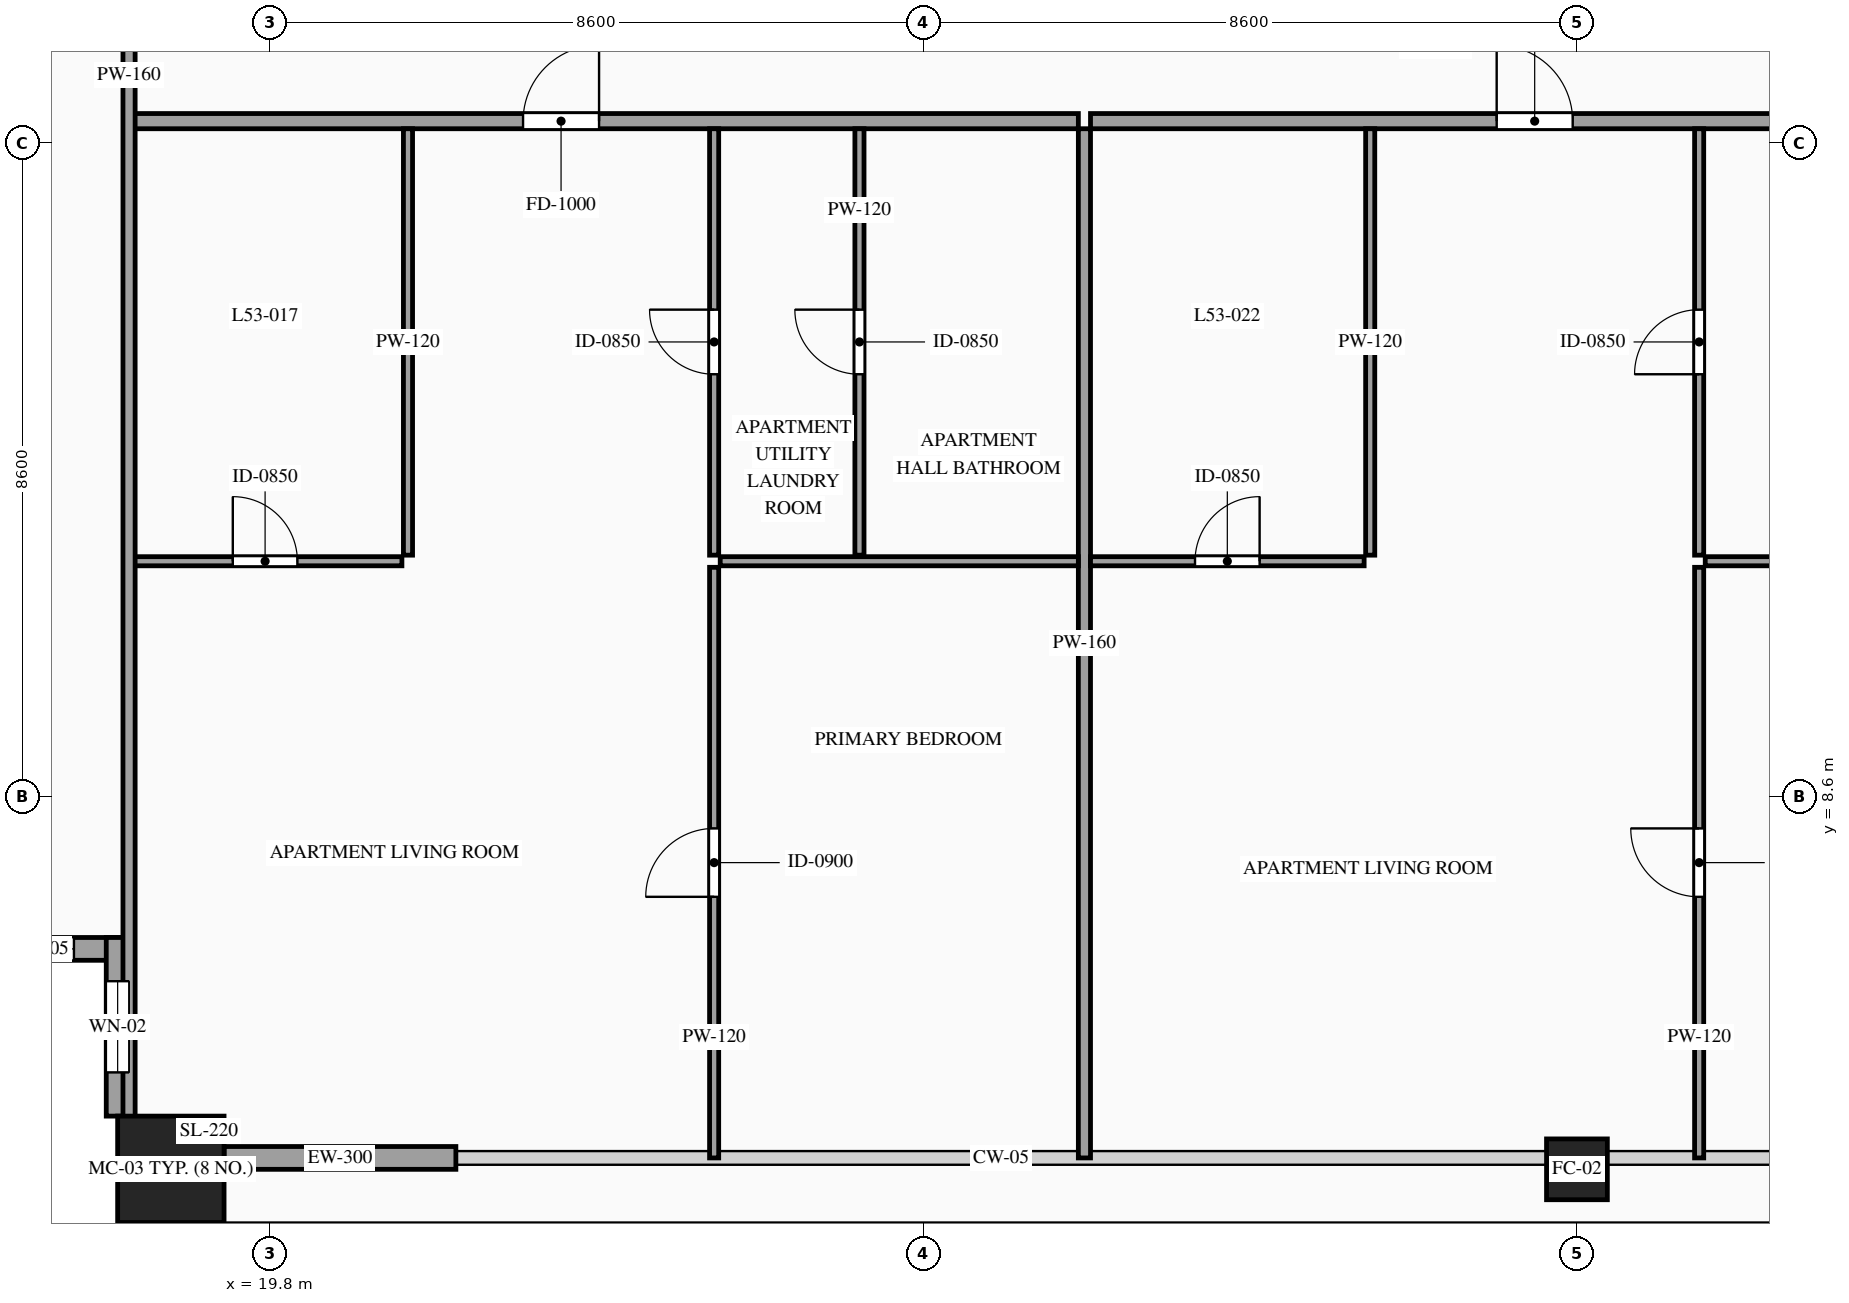
"""IFC4 building model, lengths in metres.
Left out: names, types, materials, properties, quantities, classifications, styles, units other than length and angle.
Written with IfcOpenShell. Run it as: python <this file> out.ifc"""

import sys

from ifc_helpers import new_model, si_unit, direction, frame, frame_2d, origin, origin_2d, place, context, subcontext, project, spatial, rectangle, hollow_rectangle, extrude, source, transform, mapped, element, fill, save


model = new_model("IFC4")
c1 = context("Model", 3, precision=1e-05, world=origin(), true_north=direction((0.0, 1.0)))
c2 = subcontext(c1, "Body", "Model", "MODEL_VIEW")
j1 = project(units=[si_unit("LENGTHUNIT", "METRE"), si_unit("PLANEANGLEUNIT", "RADIAN")], contexts=[c1])
p1 = place(None, origin())
s1 = spatial("IfcSite", under=j1, at=p1, CompositionType="ELEMENT")
p2 = place(p1, origin())
s2 = spatial("IfcBuilding", under=s1, at=p2, CompositionType="ELEMENT")
p3 = place(p2, frame((0.0, 0.0, 202.0)))
s3 = spatial("IfcBuildingStorey", under=s2, at=p3, CompositionType="ELEMENT", Elevation=202.0)
m1 = source(origin(), c2, "Body", "SweptSolid", [
    extrude(hollow_rectangle(XDim=1.4, YDim=1.4, WallThickness=0.06, at=origin_2d()), origin(), (0.0, 0.0, 1.0), 3.5),
])
p4 = place(p3, frame((18.5, 3.7, 0.0), z_axis=(0.0, 0.0, 1.0), x_axis=(1.0, 0.0, 0.0)))
e1 = element("IfcColumn", 1, at=p4, inside=s3, PredefinedType="COLUMN", context=c2, shape_type="MappedRepresentation", body=[
    mapped(m1, transform((0.0, 0.0, 0.0), scale=1.0)),
])
m2 = source(origin(), c2, "Body", "SweptSolid", [
    extrude(hollow_rectangle(XDim=0.8, YDim=0.8, WallThickness=0.036, at=origin_2d()), origin(), (0.0, 0.0, 1.0), 3.5),
])
p5 = place(p3, frame((37.0, 3.7, 0.0), z_axis=(0.0, 0.0, 1.0), x_axis=(1.0, 0.0, 0.0)))
e2 = element("IfcColumn", 2, at=p5, inside=s3, PredefinedType="COLUMN", context=c2, shape_type="MappedRepresentation", body=[
    mapped(m2, transform((0.0, 0.0, 0.0), scale=1.0)),
])
p6 = place(p3, frame((15.6, 6.6, 0.0), z_axis=(0.0, 0.0, 1.0), x_axis=(1.0, 0.0, 0.0)))
e3 = element("IfcWall", 3, at=p6, inside=s3, PredefinedType="SOLIDWALL", context=c2, shape_type="SweptSolid", body=[
    extrude(rectangle(XDim=2.35, YDim=0.3, at=frame_2d((1.175, 0.0))), origin(), (0.0, 0.0, 1.0), 3.28),
])
p7 = place(p6, frame((0.725, 0.0, 0.85)))
e4 = element("IfcOpeningElement", 4, at=p7, cuts=e3, PredefinedType="OPENING", context=c2, shape_type="SweptSolid", body=[
    extrude(rectangle(XDim=0.9, YDim=1.5, at=frame_2d((0.45, 0.75))), frame((0.0, 0.165, 0.0), z_axis=(0.0, -1.0, 0.0), x_axis=(1.0, 0.0, 0.0)), (0.0, 0.0, 1.0), 0.33),
])
p8 = place(p3, frame((17.8, 6.75, 0.0), z_axis=(0.0, 0.0, 1.0), x_axis=(0.0, -1.0, 0.0)))
e5 = element("IfcWall", 5, at=p8, inside=s3, PredefinedType="SOLIDWALL", context=c2, shape_type="SweptSolid", body=[
    extrude(rectangle(XDim=2.35, YDim=0.3, at=frame_2d((1.175, 0.0))), origin(), (0.0, 0.0, 1.0), 3.28),
])
p9 = place(p8, frame((0.575, 0.0, 0.85)))
e6 = element("IfcOpeningElement", 6, at=p9, cuts=e5, PredefinedType="OPENING", context=c2, shape_type="SweptSolid", body=[
    extrude(rectangle(XDim=1.2, YDim=2.1, at=frame_2d((0.6, 1.05))), frame((0.0, 0.165, 0.0), z_axis=(0.0, -1.0, 0.0), x_axis=(1.0, 0.0, 0.0)), (0.0, 0.0, 1.0), 0.33),
])
m3 = source(origin(), c2, "Body", "SweptSolid", [
    extrude(rectangle(XDim=3.05, YDim=0.3, at=frame_2d((1.525, 0.0))), origin(), (0.0, 0.0, 1.0), 2.835),
])
p10 = place(p3, frame((19.2, 3.85, 0.0), z_axis=(0.0, 0.0, 1.0), x_axis=(1.0, 0.0, 0.0)))
e7 = element("IfcWall", 7, at=p10, inside=s3, PredefinedType="SOLIDWALL", context=c2, shape_type="MappedRepresentation", body=[
    mapped(m3, transform((0.0, 0.0, 0.0), scale=1.0)),
])
p11 = place(p3, frame((17.94, 17.49, 0.0), z_axis=(0.0, 0.0, 1.0), x_axis=(1.0, 0.0, 0.0)))
e8 = element("IfcWall", 8, at=p11, inside=s3, PredefinedType="PARTITIONING", context=c2, shape_type="SweptSolid", body=[
    extrude(rectangle(XDim=12.5, YDim=0.2, at=frame_2d((6.25, 0.0))), origin(), (0.0, 0.0, 1.0), 3.28),
])
p12 = place(p11, frame((5.194, 0.0, 0.0)))
e9 = element("IfcOpeningElement", 9, at=p12, cuts=e8, PredefinedType="OPENING", context=c2, shape_type="SweptSolid", body=[
    extrude(rectangle(XDim=1.0, YDim=2.2, at=frame_2d((0.5, 1.1))), frame((0.0, 0.115, 0.0), z_axis=(0.0, -1.0, 0.0), x_axis=(1.0, 0.0, 0.0)), (0.0, 0.0, 1.0), 0.23),
])
m4 = source(origin(), c2, "Body", "SweptSolid", [
    extrude(rectangle(XDim=13.54, YDim=0.16, at=frame_2d((6.77, 0.0))), origin(), (0.0, 0.0, 1.0), 3.28),
])
p13 = place(p3, frame((30.52, 3.85, 0.0), z_axis=(0.0, 0.0, 1.0), x_axis=(0.0, 1.0, 0.0)))
e10 = element("IfcWall", 10, at=p13, inside=s3, PredefinedType="PARTITIONING", context=c2, shape_type="MappedRepresentation", body=[
    mapped(m4, transform((0.0, 0.0, 0.0), scale=1.0)),
])
p14 = place(p3, frame((17.94, 11.7, 0.0), z_axis=(0.0, 0.0, 1.0), x_axis=(1.0, 0.0, 0.0)))
e11 = element("IfcWall", 11, at=p14, inside=s3, PredefinedType="PARTITIONING", context=c2, shape_type="SweptSolid", body=[
    extrude(rectangle(XDim=3.6, YDim=0.12, at=frame_2d((1.8, 0.0))), origin(), (0.0, 0.0, 1.0), 3.28),
])
p15 = place(p14, frame((1.375, 0.0, 0.0)))
e12 = element("IfcOpeningElement", 12, at=p15, cuts=e11, PredefinedType="OPENING", context=c2, shape_type="SweptSolid", body=[
    extrude(rectangle(XDim=0.85, YDim=2.1, at=frame_2d((0.425, 1.05))), frame((0.0, 0.075, 0.0), z_axis=(0.0, -1.0, 0.0), x_axis=(1.0, 0.0, 0.0)), (0.0, 0.0, 1.0), 0.15),
])
m5 = source(origin(), c2, "Body", "SweptSolid", [
    extrude(rectangle(XDim=5.61, YDim=0.12, at=frame_2d((2.805, 0.0))), origin(), (0.0, 0.0, 1.0), 3.28),
])
p16 = place(p3, frame((21.62, 11.78, 0.0), z_axis=(0.0, 0.0, 1.0), x_axis=(0.0, 1.0, 0.0)))
e13 = element("IfcWall", 13, at=p16, inside=s3, PredefinedType="PARTITIONING", context=c2, shape_type="MappedRepresentation", body=[
    mapped(m5, transform((0.0, 0.0, 0.0), scale=1.0)),
])
p17 = place(p3, frame((27.56, 11.78, 0.0), z_axis=(0.0, 0.0, 1.0), x_axis=(0.0, 1.0, 0.0)))
e14 = element("IfcWall", 14, at=p17, inside=s3, PredefinedType="PARTITIONING", context=c2, shape_type="SweptSolid", body=[
    extrude(rectangle(XDim=5.61, YDim=0.12, at=frame_2d((2.805, 0.0))), origin(), (0.0, 0.0, 1.0), 3.28),
])
p18 = place(p17, frame((2.38, 0.0, 0.0)))
e15 = element("IfcOpeningElement", 15, at=p18, cuts=e14, PredefinedType="OPENING", context=c2, shape_type="SweptSolid", body=[
    extrude(rectangle(XDim=0.85, YDim=2.1, at=frame_2d((0.425, 1.05))), frame((0.0, 0.075, 0.0), z_axis=(0.0, -1.0, 0.0), x_axis=(1.0, 0.0, 0.0)), (0.0, 0.0, 1.0), 0.15),
])
m6 = source(origin(), c2, "Body", "SweptSolid", [
    extrude(rectangle(XDim=4.712, YDim=0.12, at=frame_2d((2.356, 0.0))), origin(), (0.0, 0.0, 1.0), 2.875),
])
p19 = place(p3, frame((25.728, 11.7, 0.0), z_axis=(0.0, 0.0, 1.0), x_axis=(1.0, 0.0, 0.0)))
e16 = element("IfcWall", 16, at=p19, inside=s3, PredefinedType="PARTITIONING", context=c2, shape_type="MappedRepresentation", body=[
    mapped(m6, transform((0.0, 0.0, 0.0), scale=1.0)),
])
p20 = place(p3, frame((25.648, 3.85, 0.0), z_axis=(0.0, 0.0, 1.0), x_axis=(0.0, 1.0, 0.0)))
e17 = element("IfcWall", 17, at=p20, inside=s3, PredefinedType="PARTITIONING", context=c2, shape_type="SweptSolid", body=[
    extrude(rectangle(XDim=7.77, YDim=0.12, at=frame_2d((3.885, 0.0))), origin(), (0.0, 0.0, 1.0), 3.28),
])
p21 = place(p20, frame((3.435, 0.0, 0.0)))
e18 = element("IfcOpeningElement", 18, at=p21, cuts=e17, PredefinedType="OPENING", context=c2, shape_type="SweptSolid", body=[
    extrude(rectangle(XDim=0.9, YDim=2.15, at=frame_2d((0.45, 1.075))), frame((0.0, 0.075, 0.0), z_axis=(0.0, -1.0, 0.0), x_axis=(1.0, 0.0, 0.0)), (0.0, 0.0, 1.0), 0.15),
])
p22 = place(p3, frame((25.648, 11.78, 0.0), z_axis=(0.0, 0.0, 1.0), x_axis=(0.0, 1.0, 0.0)))
e19 = element("IfcWall", 19, at=p22, inside=s3, PredefinedType="PARTITIONING", context=c2, shape_type="SweptSolid", body=[
    extrude(rectangle(XDim=5.61, YDim=0.12, at=frame_2d((2.805, 0.0))), origin(), (0.0, 0.0, 1.0), 3.28),
])
p23 = place(p22, frame((2.38, 0.0, 0.0)))
e20 = element("IfcOpeningElement", 20, at=p23, cuts=e19, PredefinedType="OPENING", context=c2, shape_type="SweptSolid", body=[
    extrude(rectangle(XDim=0.85, YDim=2.1, at=frame_2d((0.425, 1.05))), frame((0.0, 0.075, 0.0), z_axis=(0.0, -1.0, 0.0), x_axis=(1.0, 0.0, 0.0)), (0.0, 0.0, 1.0), 0.15),
])
p24 = place(p3, frame((30.6, 17.49, 0.0), z_axis=(0.0, 0.0, 1.0), x_axis=(1.0, 0.0, 0.0)))
e21 = element("IfcWall", 21, at=p24, inside=s3, PredefinedType="PARTITIONING", context=c2, shape_type="SweptSolid", body=[
    extrude(rectangle(XDim=12.8, YDim=0.2, at=frame_2d((6.4, 0.0))), origin(), (0.0, 0.0, 1.0), 3.28),
])
p25 = place(p24, frame((5.344, 0.0, 0.0)))
e22 = element("IfcOpeningElement", 22, at=p25, cuts=e21, PredefinedType="OPENING", context=c2, shape_type="SweptSolid", body=[
    extrude(rectangle(XDim=1.0, YDim=2.2, at=frame_2d((0.5, 1.1))), frame((0.0, 0.115, 0.0), z_axis=(0.0, -1.0, 0.0), x_axis=(1.0, 0.0, 0.0)), (0.0, 0.0, 1.0), 0.23),
])
p26 = place(p3, frame((30.6, 11.7, 0.0), z_axis=(0.0, 0.0, 1.0), x_axis=(1.0, 0.0, 0.0)))
e23 = element("IfcWall", 23, at=p26, inside=s3, PredefinedType="PARTITIONING", context=c2, shape_type="SweptSolid", body=[
    extrude(rectangle(XDim=3.6, YDim=0.12, at=frame_2d((1.8, 0.0))), origin(), (0.0, 0.0, 1.0), 2.875),
])
p27 = place(p26, frame((1.375, 0.0, 0.0)))
e24 = element("IfcOpeningElement", 24, at=p27, cuts=e23, PredefinedType="OPENING", context=c2, shape_type="SweptSolid", body=[
    extrude(rectangle(XDim=0.85, YDim=2.1, at=frame_2d((0.425, 1.05))), frame((0.0, 0.075, 0.0), z_axis=(0.0, -1.0, 0.0), x_axis=(1.0, 0.0, 0.0)), (0.0, 0.0, 1.0), 0.15),
])
p28 = place(p3, frame((34.28, 11.78, 0.0), z_axis=(0.0, 0.0, 1.0), x_axis=(0.0, 1.0, 0.0)))
e25 = element("IfcWall", 25, at=p28, inside=s3, PredefinedType="PARTITIONING", context=c2, shape_type="MappedRepresentation", body=[
    mapped(m5, transform((0.0, 0.0, 0.0), scale=1.0)),
])
p29 = place(p3, frame((38.688, 11.7, 0.0), z_axis=(0.0, 0.0, 1.0), x_axis=(1.0, 0.0, 0.0)))
e26 = element("IfcWall", 26, at=p29, inside=s3, PredefinedType="PARTITIONING", context=c2, shape_type="MappedRepresentation", body=[
    mapped(m6, transform((0.0, 0.0, 0.0), scale=1.0)),
])
p30 = place(p3, frame((38.608, 3.85, 0.0), z_axis=(0.0, 0.0, 1.0), x_axis=(0.0, 1.0, 0.0)))
e27 = element("IfcWall", 27, at=p30, inside=s3, PredefinedType="PARTITIONING", context=c2, shape_type="SweptSolid", body=[
    extrude(rectangle(XDim=7.77, YDim=0.12, at=frame_2d((3.885, 0.0))), origin(), (0.0, 0.0, 1.0), 3.28),
])
p31 = place(p30, frame((3.435, 0.0, 0.0)))
e28 = element("IfcOpeningElement", 28, at=p31, cuts=e27, PredefinedType="OPENING", context=c2, shape_type="SweptSolid", body=[
    extrude(rectangle(XDim=0.9, YDim=2.15, at=frame_2d((0.45, 1.075))), frame((0.0, 0.075, 0.0), z_axis=(0.0, -1.0, 0.0), x_axis=(1.0, 0.0, 0.0)), (0.0, 0.0, 1.0), 0.15),
])
p32 = place(p3, frame((38.608, 11.78, 0.0), z_axis=(0.0, 0.0, 1.0), x_axis=(0.0, 1.0, 0.0)))
e29 = element("IfcWall", 29, at=p32, inside=s3, PredefinedType="PARTITIONING", context=c2, shape_type="SweptSolid", body=[
    extrude(rectangle(XDim=5.61, YDim=0.12, at=frame_2d((2.805, 0.0))), origin(), (0.0, 0.0, 1.0), 3.28),
])
p33 = place(p32, frame((2.38, 0.0, 0.0)))
e30 = element("IfcOpeningElement", 30, at=p33, cuts=e29, PredefinedType="OPENING", context=c2, shape_type="SweptSolid", body=[
    extrude(rectangle(XDim=0.85, YDim=2.1, at=frame_2d((0.425, 1.05))), frame((0.0, 0.075, 0.0), z_axis=(0.0, -1.0, 0.0), x_axis=(1.0, 0.0, 0.0)), (0.0, 0.0, 1.0), 0.15),
])
m7 = source(origin(), c2, "Body", "SweptSolid", [
    extrude(rectangle(XDim=28.19, YDim=0.16, at=frame_2d((14.095, 0.0))), origin(), (0.0, 0.0, 1.0), 3.28),
])
p34 = place(p3, frame((17.95, 4.0, 0.0), z_axis=(0.0, 0.0, 1.0), x_axis=(0.0, 1.0, 0.0)))
e31 = element("IfcWall", 31, at=p34, inside=s3, PredefinedType="PARTITIONING", context=c2, shape_type="MappedRepresentation", body=[
    mapped(m7, transform((0.0, 0.0, 0.0), scale=1.0)),
])
m8 = source(origin(), c2, "Body", "SweptSolid", [
    extrude(rectangle(XDim=0.9, YDim=1.5, at=frame_2d((0.45, 0.75))), frame((0.0, 0.03, 0.0), z_axis=(0.0, -1.0, 0.0), x_axis=(1.0, 0.0, 0.0)), (0.0, 0.0, 1.0), 0.06),
])
p35 = place(p7, origin())
e32 = element("IfcWindow", 32, at=p35, inside=s3, PartitioningType="SINGLE_PANEL", PredefinedType="WINDOW", context=c2, shape_type="MappedRepresentation", body=[
    mapped(m8, transform((0.0, 0.0, 0.0), scale=1.0)),
])
fill(e4, e32)
m9 = source(origin(), c2, "Body", "SweptSolid", [
    extrude(rectangle(XDim=1.2, YDim=2.1, at=frame_2d((0.6, 1.05))), frame((0.0, 0.03, 0.0), z_axis=(0.0, -1.0, 0.0), x_axis=(1.0, 0.0, 0.0)), (0.0, 0.0, 1.0), 0.06),
])
p36 = place(p9, origin())
e33 = element("IfcWindow", 33, at=p36, inside=s3, PartitioningType="SINGLE_PANEL", PredefinedType="WINDOW", context=c2, shape_type="MappedRepresentation", body=[
    mapped(m9, transform((0.0, 0.0, 0.0), scale=1.0)),
])
fill(e6, e33)
m10 = source(origin(), c2, "Body", "SweptSolid", [
    extrude(rectangle(XDim=1.0, YDim=2.2, at=frame_2d((0.5, 1.1))), frame((0.0, 0.025, 0.0), z_axis=(0.0, -1.0, 0.0), x_axis=(1.0, 0.0, 0.0)), (0.0, 0.0, 1.0), 0.05),
])
p37 = place(p12, origin())
e34 = element("IfcDoor", 34, at=p37, inside=s3, OperationType="SINGLE_SWING_RIGHT", PredefinedType="DOOR", context=c2, shape_type="MappedRepresentation", body=[
    mapped(m10, transform((0.0, 0.0, 0.0), scale=1.0)),
])
fill(e9, e34)
m11 = source(origin(), c2, "Body", "SweptSolid", [
    extrude(rectangle(XDim=0.85, YDim=2.1, at=frame_2d((0.425, 1.05))), frame((0.0, 0.025, 0.0), z_axis=(0.0, -1.0, 0.0), x_axis=(1.0, 0.0, 0.0)), (0.0, 0.0, 1.0), 0.05),
])
p38 = place(p15, origin())
e35 = element("IfcDoor", 35, at=p38, inside=s3, OperationType="SINGLE_SWING_LEFT", PredefinedType="DOOR", context=c2, shape_type="MappedRepresentation", body=[
    mapped(m11, transform((0.0, 0.0, 0.0), scale=1.0)),
])
fill(e12, e35)
p39 = place(p18, origin())
e36 = element("IfcDoor", 36, at=p39, inside=s3, OperationType="SINGLE_SWING_RIGHT", PredefinedType="DOOR", context=c2, shape_type="MappedRepresentation", body=[
    mapped(m11, transform((0.0, 0.0, 0.0), scale=1.0)),
])
fill(e15, e36)
m12 = source(origin(), c2, "Body", "SweptSolid", [
    extrude(rectangle(XDim=0.9, YDim=2.15, at=frame_2d((0.45, 1.075))), frame((0.0, 0.025, 0.0), z_axis=(0.0, -1.0, 0.0), x_axis=(1.0, 0.0, 0.0)), (0.0, 0.0, 1.0), 0.05),
])
p40 = place(p21, origin())
e37 = element("IfcDoor", 37, at=p40, inside=s3, OperationType="SINGLE_SWING_LEFT", PredefinedType="DOOR", context=c2, shape_type="MappedRepresentation", body=[
    mapped(m12, transform((0.0, 0.0, 0.0), scale=1.0)),
])
fill(e18, e37)
p41 = place(p23, origin())
e38 = element("IfcDoor", 38, at=p41, inside=s3, OperationType="SINGLE_SWING_RIGHT", PredefinedType="DOOR", context=c2, shape_type="MappedRepresentation", body=[
    mapped(m11, transform((0.0, 0.0, 0.0), scale=1.0)),
])
fill(e20, e38)
p42 = place(p25, origin())
e39 = element("IfcDoor", 39, at=p42, inside=s3, OperationType="SINGLE_SWING_LEFT", PredefinedType="DOOR", context=c2, shape_type="MappedRepresentation", body=[
    mapped(m10, transform((0.0, 0.0, 0.0), scale=1.0)),
])
fill(e22, e39)
p43 = place(p27, origin())
e40 = element("IfcDoor", 40, at=p43, inside=s3, OperationType="SINGLE_SWING_RIGHT", PredefinedType="DOOR", context=c2, shape_type="MappedRepresentation", body=[
    mapped(m11, transform((0.0, 0.0, 0.0), scale=1.0)),
])
fill(e24, e40)
p44 = place(p31, origin())
e41 = element("IfcDoor", 41, at=p44, inside=s3, OperationType="SINGLE_SWING_RIGHT", PredefinedType="DOOR", context=c2, shape_type="MappedRepresentation", body=[
    mapped(m12, transform((0.0, 0.0, 0.0), scale=1.0)),
])
fill(e28, e41)
p45 = place(p33, origin())
e42 = element("IfcDoor", 42, at=p45, inside=s3, OperationType="SINGLE_SWING_LEFT", PredefinedType="DOOR", context=c2, shape_type="MappedRepresentation", body=[
    mapped(m11, transform((0.0, 0.0, 0.0), scale=1.0)),
])
fill(e30, e42)
save(model, sys.argv[1])
